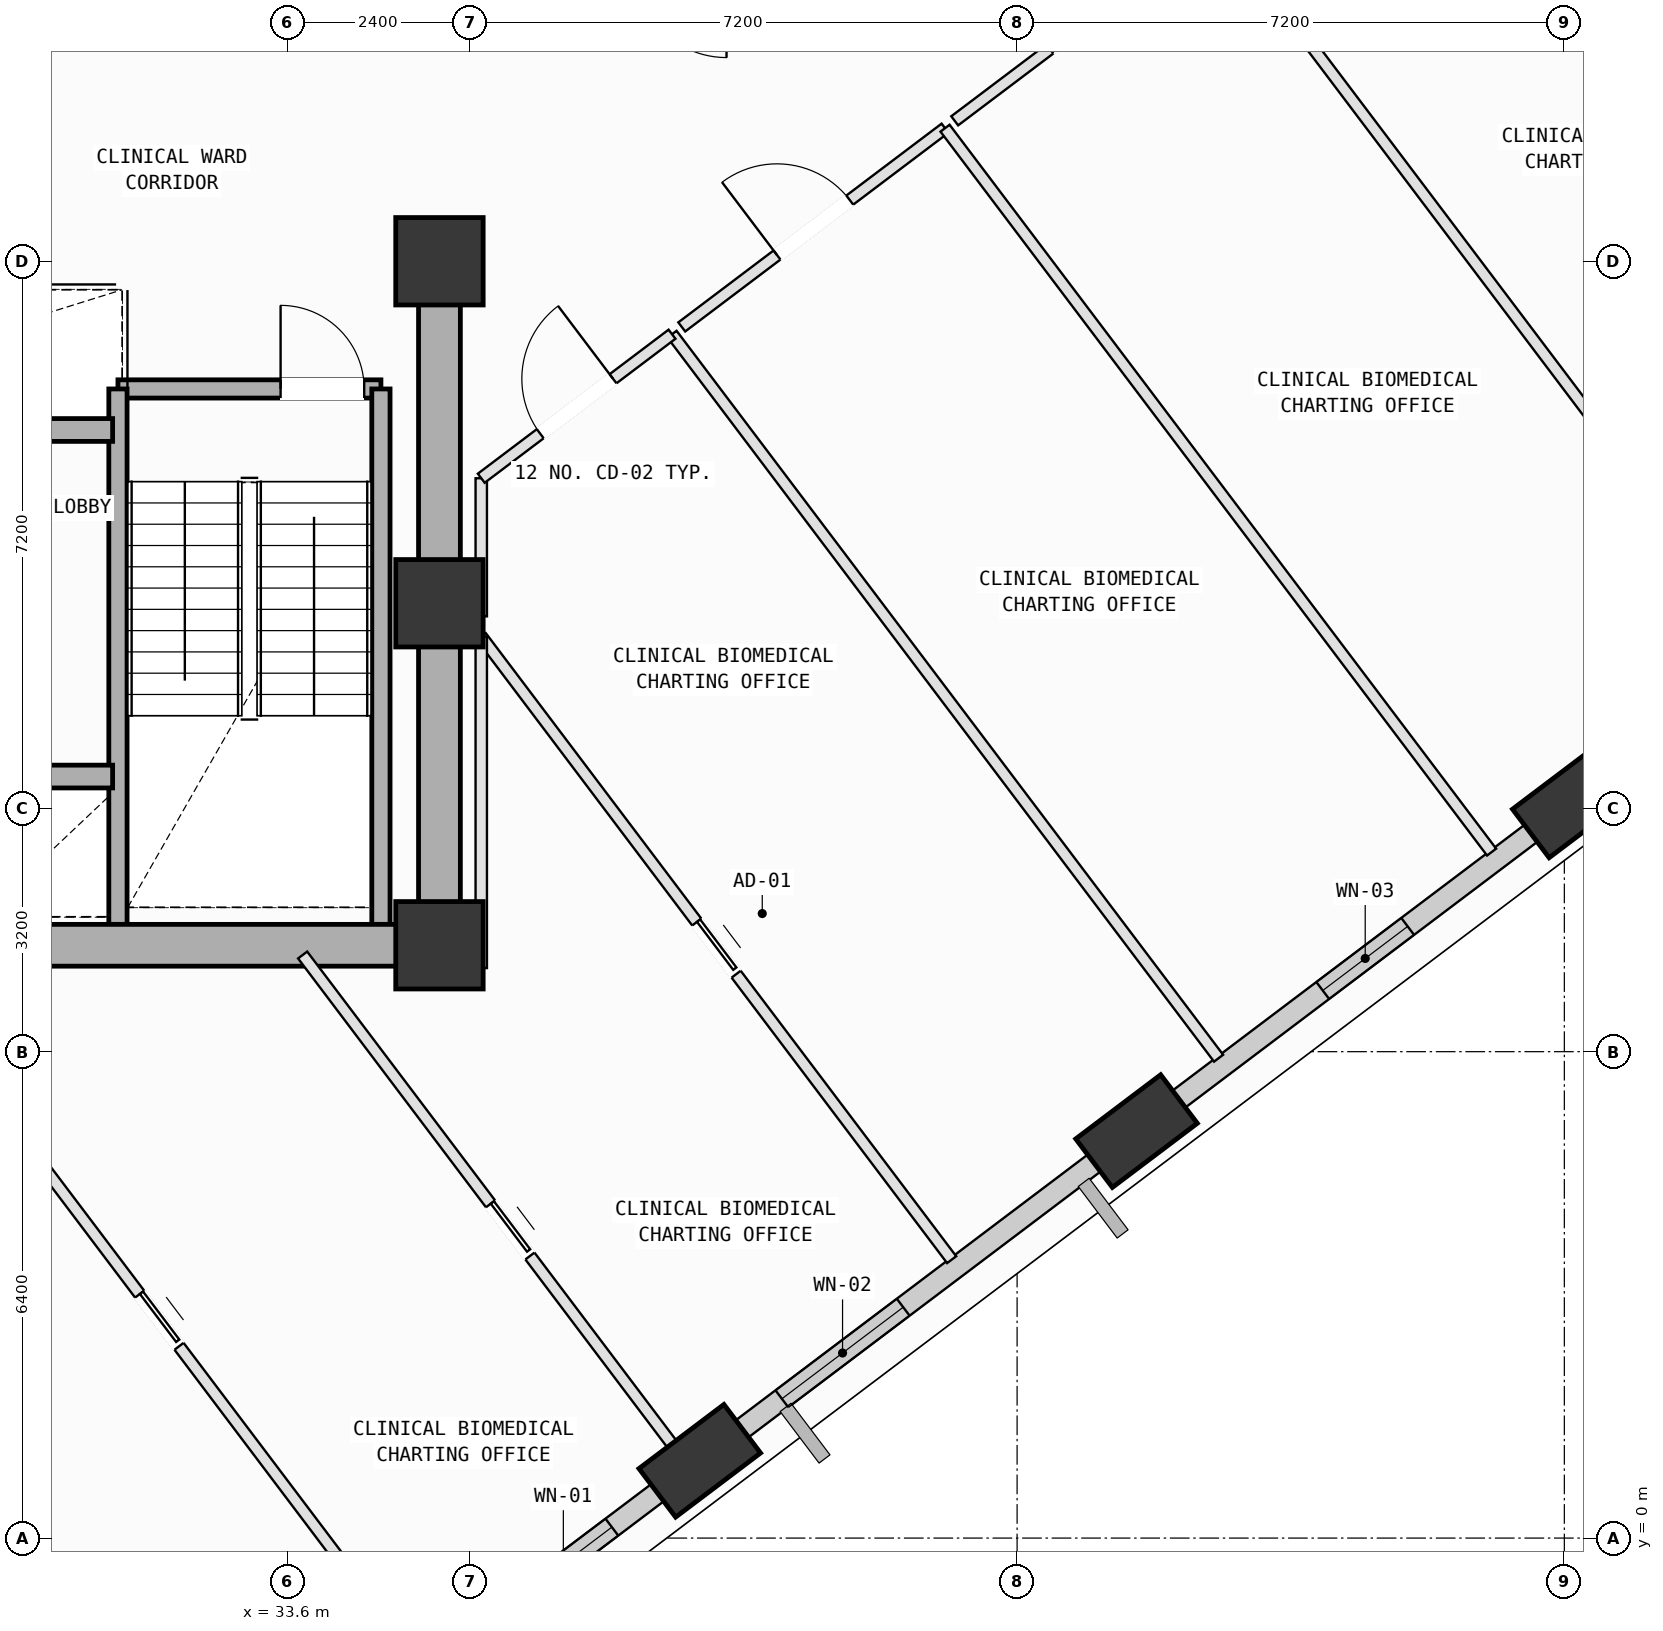
"""IFC4 building model, lengths in metres.
Left out: names, types, materials, properties, quantities, classifications, styles, units other than length and angle.
Written with IfcOpenShell. Run it as: python <this file> out.ifc"""

import sys

from ifc_helpers import new_model, si_unit, direction, frame, frame_2d, origin, origin_2d, place, context, subcontext, project, spatial, rectangle, extrude, element, fill, save


model = new_model("IFC4")
c1 = context("Model", 3, precision=1e-05, world=origin(), true_north=direction((0.0, 1.0)))
c2 = subcontext(c1, "Body", "Model", "MODEL_VIEW")
j1 = project(units=[si_unit("LENGTHUNIT", "METRE"), si_unit("PLANEANGLEUNIT", "RADIAN")], contexts=[c1])
p1 = place(None, origin())
s1 = spatial("IfcSite", under=j1, at=p1, CompositionType="ELEMENT")
p2 = place(p1, origin())
s2 = spatial("IfcBuilding", under=s1, at=p2, CompositionType="ELEMENT")
p3 = place(p2, frame((0.0, 0.0, 181.8)))
s3 = spatial("IfcBuildingStorey", under=s2, at=p3, CompositionType="ELEMENT", Elevation=181.8)
for number, where, z_axis, x_axis in (
    (1, (35.6, 7.8, 0.0), (0.0, 0.0, 1.0), (1.0, 0.0, 0.0)),
    (2, (35.6, 12.3, 0.0), (0.0, 0.0, 1.0), (1.0, 0.0, 0.0)),
    (3, (35.6, 16.8, 0.0), (0.0, 0.0, 1.0), (1.0, 0.0, 0.0)),
):
    element("IfcColumn", number, at=place(p3, frame(where, z_axis=z_axis, x_axis=x_axis)), inside=s3, PredefinedType="COLUMN", context=c2, shape_type="SweptSolid", body=[
        extrude(rectangle(XDim=1.15, YDim=1.15, at=origin_2d()), origin(), (0.0, 0.0, 1.0), 4.0),
    ])
p4 = place(p3, frame((39.025, 1.017, 0.002), z_axis=(0.09791826999, 0.023157579681, 0.994924991598), x_axis=(-0.767046942776, 0.638720341276, 0.060624361585)))
e4 = element("IfcColumn", 4, at=p4, inside=s3, PredefinedType="COLUMN", context=c2, shape_type="SweptSolid", body=[
    extrude(rectangle(XDim=1.4, YDim=0.8, at=origin_2d()), origin(), (0.0, 0.0, 1.0), 4.017),
])
p5 = place(p3, frame((44.771, 5.355, 0.002), z_axis=(0.079868491855, 0.046716680689, 0.995710086197), x_axis=(-0.920806126537, 0.386015680716, 0.055749184517)))
e5 = element("IfcColumn", 5, at=p5, inside=s3, PredefinedType="COLUMN", context=c2, shape_type="SweptSolid", body=[
    extrude(rectangle(XDim=1.4, YDim=0.8, at=origin_2d()), origin(), (0.0, 0.0, 1.0), 4.014),
])
p6 = place(p3, frame((50.518, 9.693, 0.002), z_axis=(0.061795746377, 0.070371730864, 0.995604894135), x_axis=(-0.995519092087, 0.075879665536, 0.05642706485)))
e6 = element("IfcColumn", 6, at=p6, inside=s3, PredefinedType="COLUMN", context=c2, shape_type="SweptSolid", body=[
    extrude(rectangle(XDim=1.4, YDim=0.8, at=origin_2d()), origin(), (0.0, 0.0, 1.0), 4.014),
])
p7 = place(p3, frame((38.782, 0.833, 0.0), z_axis=(0.0, 0.0, 1.0), x_axis=(-0.798116310231, -0.602503406914, 0.0)))
e7 = element("IfcWall", 7, at=p7, inside=s3, PredefinedType="SOLIDWALL", context=c2, shape_type="SweptSolid", body=[
    extrude(rectangle(XDim=6.234, YDim=0.28, at=frame_2d((3.117, 0.0))), origin(), (0.0, 0.0, 1.0), 3.265),
])
p8 = place(p7, frame((1.145, 0.0, 0.75)))
e8 = element("IfcOpeningElement", 8, at=p8, cuts=e7, PredefinedType="OPENING", context=c2, shape_type="SweptSolid", body=[
    extrude(rectangle(XDim=1.6, YDim=1.95, at=frame_2d((0.8, 0.975))), frame((0.0, 0.15, 0.0), z_axis=(0.0, -1.0, 0.0), x_axis=(1.0, 0.0, 0.0)), (0.0, 0.0, 1.0), 0.3),
])
p9 = place(p3, frame((44.523, 5.167, 0.0), z_axis=(0.0, 0.0, 1.0), x_axis=(-0.798115007823, -0.602505132167, 0.0)))
e9 = element("IfcWall", 9, at=p9, inside=s3, PredefinedType="SOLIDWALL", context=c2, shape_type="SweptSolid", body=[
    extrude(rectangle(XDim=6.214, YDim=0.28, at=frame_2d((3.107, 0.0))), origin(), (0.0, 0.0, 1.0), 3.265),
])
p10 = place(p9, frame((3.535, 0.0, 0.75)))
e10 = element("IfcOpeningElement", 10, at=p10, cuts=e9, PredefinedType="OPENING", context=c2, shape_type="SweptSolid", body=[
    extrude(rectangle(XDim=2.0, YDim=1.95, at=frame_2d((1.0, 0.975))), frame((0.0, 0.15, 0.0), z_axis=(0.0, -1.0, 0.0), x_axis=(1.0, 0.0, 0.0)), (0.0, 0.0, 1.0), 0.3),
])
p11 = place(p3, frame((50.27, 9.506, 0.0), z_axis=(0.0, 0.0, 1.0), x_axis=(-0.798099248816, -0.60252600694, 0.0)))
e11 = element("IfcWall", 11, at=p11, inside=s3, PredefinedType="SOLIDWALL", context=c2, shape_type="SweptSolid", body=[
    extrude(rectangle(XDim=6.209, YDim=0.28, at=frame_2d((3.104, 0.0))), origin(), (0.0, 0.0, 1.0), 3.265),
])
p12 = place(p11, frame((2.419, 0.0, 0.75)))
e12 = element("IfcOpeningElement", 12, at=p12, cuts=e11, PredefinedType="OPENING", context=c2, shape_type="SweptSolid", body=[
    extrude(rectangle(XDim=1.4, YDim=1.85, at=frame_2d((0.7, 0.925))), frame((0.0, 0.15, 0.0), z_axis=(0.0, -1.0, 0.0), x_axis=(1.0, 0.0, 0.0)), (0.0, 0.0, 1.0), 0.3),
])
p13 = place(p3, frame((31.37, 15.12, 0.0), z_axis=(0.0, 0.0, 1.0), x_axis=(1.0, 0.0, 0.0)))
e13 = element("IfcWall", 13, at=p13, inside=s3, PredefinedType="SOLIDWALL", context=c2, shape_type="SweptSolid", body=[
    extrude(rectangle(XDim=3.46, YDim=0.24, at=frame_2d((1.73, 0.0))), origin(), (0.0, 0.0, 1.0), 3.78),
])
p14 = place(p13, frame((2.14, 0.0, 0.0)))
e14 = element("IfcOpeningElement", 14, at=p14, cuts=e13, PredefinedType="OPENING", context=c2, shape_type="SweptSolid", body=[
    extrude(rectangle(XDim=1.1, YDim=2.15, at=frame_2d((0.55, 1.075))), frame((0.0, 0.13, 0.0), z_axis=(0.0, -1.0, 0.0), x_axis=(1.0, 0.0, 0.0)), (0.0, 0.0, 1.0), 0.26),
])
for number, where, z_axis, x_axis in (
    (15, (34.83, 15.12, 0.0), (0.0, 0.0, 1.0), (0.0, -1.0, 0.0)),
    (16, (31.37, 8.075, 0.0), (0.0, 0.0, 1.0), (0.0, 1.0, 0.0)),
):
    element("IfcWall", number, at=place(p3, frame(where, z_axis=z_axis, x_axis=x_axis)), inside=s3, PredefinedType="SOLIDWALL", context=c2, shape_type="SweptSolid", body=[
        extrude(rectangle(XDim=7.045, YDim=0.24, at=frame_2d((3.522, 0.0))), origin(), (0.0, 0.0, 1.0), 3.78),
    ])
p15 = place(p3, frame((24.8, 7.8, 0.0), z_axis=(0.0, 0.0, 1.0), x_axis=(1.0, 0.0, 0.0)))
e17 = element("IfcWall", 17, at=p15, inside=s3, PredefinedType="SHEAR", context=c2, shape_type="SweptSolid", body=[
    extrude(rectangle(XDim=10.8, YDim=0.55, at=frame_2d((5.4, 0.0))), origin(), (0.0, 0.0, 1.0), 3.78),
])
p16 = place(p3, frame((35.6, 7.8, 0.0), z_axis=(0.0, 0.0, 1.0), x_axis=(0.0, 1.0, 0.0)))
e18 = element("IfcWall", 18, at=p16, inside=s3, PredefinedType="SHEAR", context=c2, shape_type="SweptSolid", body=[
    extrude(rectangle(XDim=9.0, YDim=0.55, at=frame_2d((4.5, 0.0))), origin(), (0.0, 0.0, 1.0), 3.78),
])
p17 = place(p3, frame((29.6, 10.02, 0.0), z_axis=(0.0, 0.0, 1.0), x_axis=(1.0, 0.0, 0.0)))
e19 = element("IfcWall", 19, at=p17, inside=s3, PredefinedType="SOLIDWALL", context=c2, shape_type="SweptSolid", body=[
    extrude(rectangle(XDim=1.7, YDim=0.3, at=frame_2d((0.85, 0.0))), origin(), (0.0, 0.0, 1.0), 3.78),
])
p18 = place(p3, frame((25.85, 14.58, 0.0), z_axis=(0.0, 0.0, 1.0), x_axis=(1.0, 0.0, 0.0)))
e20 = element("IfcWall", 20, at=p18, inside=s3, PredefinedType="SOLIDWALL", context=c2, shape_type="SweptSolid", body=[
    extrude(rectangle(XDim=5.45, YDim=0.3, at=frame_2d((2.725, 0.0))), origin(), (0.0, 0.0, 1.0), 3.78),
])
p19 = place(p18, frame((0.34, 0.0, 0.0)))
e21 = element("IfcOpeningElement", 21, at=p19, cuts=e20, PredefinedType="OPENING", context=c2, shape_type="SweptSolid", body=[
    extrude(rectangle(XDim=1.12, YDim=2.15, at=frame_2d((0.56, 1.075))), frame((0.0, 0.16, 0.0), z_axis=(0.0, -1.0, 0.0), x_axis=(1.0, 0.0, 0.0)), (0.0, 0.0, 1.0), 0.32),
])
p20 = place(p18, frame((2.24, 0.0, 0.0)))
e22 = element("IfcOpeningElement", 22, at=p20, cuts=e20, PredefinedType="OPENING", context=c2, shape_type="SweptSolid", body=[
    extrude(rectangle(XDim=1.12, YDim=2.15, at=frame_2d((0.56, 1.075))), frame((0.0, 0.16, 0.0), z_axis=(0.0, -1.0, 0.0), x_axis=(1.0, 0.0, 0.0)), (0.0, 0.0, 1.0), 0.32),
])
p21 = place(p3, frame((28.287, 7.672, 0.0), z_axis=(0.0, 0.0, 1.0), x_axis=(0.602494949449, -0.798122694758, 0.0)))
e23 = element("IfcWall", 23, at=p21, inside=s3, PredefinedType="PARTITIONING", context=c2, shape_type="SweptSolid", body=[
    extrude(rectangle(XDim=11.666, YDim=0.15, at=frame_2d((5.833, 0.0))), origin(), (0.0, 0.0, 1.0), 3.78),
])
p22 = place(p21, frame((5.591, 0.0, 0.0)))
e24 = element("IfcOpeningElement", 24, at=p22, cuts=e23, PredefinedType="OPENING", context=c2, shape_type="SweptSolid", body=[
    extrude(rectangle(XDim=0.86, YDim=2.06, at=frame_2d((0.43, 1.03))), frame((0.0, 0.085, 0.0), z_axis=(0.0, -1.0, 0.0), x_axis=(1.0, 0.0, 0.0)), (0.0, 0.0, 1.0), 0.17),
])
p23 = place(p3, frame((33.8, 7.672, 0.0), z_axis=(0.0, 0.0, 1.0), x_axis=(0.602541315971, -0.798087691014, 0.0)))
e25 = element("IfcWall", 25, at=p23, inside=s3, PredefinedType="PARTITIONING", context=c2, shape_type="SweptSolid", body=[
    extrude(rectangle(XDim=8.69, YDim=0.15, at=frame_2d((4.345, 0.0))), origin(), (0.0, 0.0, 1.0), 3.78),
])
p24 = place(p23, frame((4.103, 0.0, 0.0)))
e26 = element("IfcOpeningElement", 26, at=p24, cuts=e25, PredefinedType="OPENING", context=c2, shape_type="SweptSolid", body=[
    extrude(rectangle(XDim=0.86, YDim=2.06, at=frame_2d((0.43, 1.03))), frame((0.0, 0.085, 0.0), z_axis=(0.0, -1.0, 0.0), x_axis=(1.0, 0.0, 0.0)), (0.0, 0.0, 1.0), 0.17),
])
p25 = place(p3, frame((36.15, 11.862, 0.0), z_axis=(0.0, 0.0, 1.0), x_axis=(0.602487751948, -0.79812812803, 0.0)))
e27 = element("IfcWall", 27, at=p25, inside=s3, PredefinedType="PARTITIONING", context=c2, shape_type="SweptSolid", body=[
    extrude(rectangle(XDim=10.273, YDim=0.15, at=frame_2d((5.136, 0.0))), origin(), (0.0, 0.0, 1.0), 3.78),
])
p26 = place(p25, frame((4.706, 0.0, 0.0)))
e28 = element("IfcOpeningElement", 28, at=p26, cuts=e27, PredefinedType="OPENING", context=c2, shape_type="SweptSolid", body=[
    extrude(rectangle(XDim=0.86, YDim=2.06, at=frame_2d((0.43, 1.03))), frame((0.0, 0.085, 0.0), z_axis=(0.0, -1.0, 0.0), x_axis=(1.0, 0.0, 0.0)), (0.0, 0.0, 1.0), 0.17),
])
p27 = place(p3, frame((39.702, 1.24, 0.0), z_axis=(0.0, 0.0, 1.0), x_axis=(-0.797956198475, -0.602715443071, 0.0)))
e29 = element("IfcWall", 29, at=p27, inside=s3, PredefinedType="PARTITIONING", context=c2, shape_type="SweptSolid", body=[
    extrude(rectangle(XDim=0.675, YDim=0.15, at=frame_2d((0.338, 0.0))), origin(), (0.0, 0.0, 1.0), 3.265),
])
p28 = place(p3, frame((35.6, 7.5, 0.0), z_axis=(0.0, 0.0, 1.0), x_axis=(1.0, 0.0, 0.0)))
e30 = element("IfcWall", 30, at=p28, inside=s3, PredefinedType="PARTITIONING", context=c2, shape_type="SweptSolid", body=[
    extrude(rectangle(XDim=0.55, YDim=0.15, at=frame_2d((0.275, 0.0))), origin(), (0.0, 0.0, 1.0), 3.065),
])
p29 = place(p3, frame((36.15, 7.5, 0.0), z_axis=(0.0, 0.0, 1.0), x_axis=(0.0, 1.0, 0.0)))
e31 = element("IfcWall", 31, at=p29, inside=s3, PredefinedType="PARTITIONING", context=c2, shape_type="SweptSolid", body=[
    extrude(rectangle(XDim=4.362, YDim=0.15, at=frame_2d((2.181, 0.0))), origin(), (0.0, 0.0, 1.0), 3.78),
])
p30 = place(p3, frame((38.66, 15.84, 0.0), z_axis=(0.0, 0.0, 1.0), x_axis=(0.602494190997, -0.798123267306, 0.0)))
e32 = element("IfcWall", 32, at=p30, inside=s3, PredefinedType="PARTITIONING", context=c2, shape_type="SweptSolid", body=[
    extrude(rectangle(XDim=11.936, YDim=0.15, at=frame_2d((5.968, 0.0))), origin(), (0.0, 0.0, 1.0), 3.78),
])
p31 = place(p3, frame((45.453, 5.581, 0.0), z_axis=(0.0, 0.0, 1.0), x_axis=(-0.798014769905, -0.602637890456, 0.0)))
e33 = element("IfcWall", 33, at=p31, inside=s3, PredefinedType="PARTITIONING", context=c2, shape_type="SweptSolid", body=[
    extrude(rectangle(XDim=0.991, YDim=0.15, at=frame_2d((0.496, 0.0))), origin(), (0.0, 0.0, 1.0), 3.265),
])
p32 = place(p3, frame((36.15, 12.128, 0.0), z_axis=(0.0, 0.0, 1.0), x_axis=(0.0, 1.0, 0.0)))
e34 = element("IfcWall", 34, at=p32, inside=s3, PredefinedType="PARTITIONING", context=c2, shape_type="SweptSolid", body=[
    extrude(rectangle(XDim=1.817, YDim=0.15, at=frame_2d((0.909, 0.0))), origin(), (0.0, 0.0, 1.0), 3.78),
])
p33 = place(p3, frame((36.15, 13.945, 0.0), z_axis=(0.0, 0.0, 1.0), x_axis=(0.79808631642, 0.602543136665, 0.0)))
e35 = element("IfcWall", 35, at=p33, inside=s3, PredefinedType="PARTITIONING", context=c2, shape_type="SweptSolid", body=[
    extrude(rectangle(XDim=3.145, YDim=0.15, at=frame_2d((1.573, 0.0))), origin(), (0.0, 0.0, 1.0), 3.78),
])
p34 = place(p33, frame((0.972, 0.0, 0.0)))
e36 = element("IfcOpeningElement", 36, at=p34, cuts=e35, PredefinedType="OPENING", context=c2, shape_type="SweptSolid", body=[
    extrude(rectangle(XDim=1.2, YDim=2.15, at=frame_2d((0.6, 1.075))), frame((0.0, 0.085, 0.0), z_axis=(0.0, -1.0, 0.0), x_axis=(1.0, 0.0, 0.0)), (0.0, 0.0, 1.0), 0.17),
])
p35 = place(p3, frame((38.788, 15.936, 0.0), z_axis=(0.0, 0.0, 1.0), x_axis=(0.798105957369, 0.602517120763, 0.0)))
e37 = element("IfcWall", 37, at=p35, inside=s3, PredefinedType="PARTITIONING", context=c2, shape_type="SweptSolid", body=[
    extrude(rectangle(XDim=4.34, YDim=0.15, at=frame_2d((2.17, 0.0))), origin(), (0.0, 0.0, 1.0), 3.78),
])
p36 = place(p35, frame((1.57, 0.0, 0.0)))
e38 = element("IfcOpeningElement", 38, at=p36, cuts=e37, PredefinedType="OPENING", context=c2, shape_type="SweptSolid", body=[
    extrude(rectangle(XDim=1.2, YDim=2.15, at=frame_2d((0.6, 1.075))), frame((0.0, 0.085, 0.0), z_axis=(0.0, -1.0, 0.0), x_axis=(1.0, 0.0, 0.0)), (0.0, 0.0, 1.0), 0.17),
])
p37 = place(p3, frame((42.252, 18.551, 0.0), z_axis=(0.0, 0.0, 1.0), x_axis=(0.602533536667, -0.798093564184, 0.0)))
e39 = element("IfcWall", 39, at=p37, inside=s3, PredefinedType="PARTITIONING", context=c2, shape_type="SweptSolid", body=[
    extrude(rectangle(XDim=11.935, YDim=0.15, at=frame_2d((5.967, 0.0))), origin(), (0.0, 0.0, 1.0), 3.78),
])
p38 = place(p3, frame((42.379, 18.648, 0.0), z_axis=(0.0, 0.0, 1.0), x_axis=(0.798234572406, 0.602346716946, 0.0)))
e40 = element("IfcWall", 40, at=p38, inside=s3, PredefinedType="PARTITIONING", context=c2, shape_type="SweptSolid", body=[
    extrude(rectangle(XDim=4.34, YDim=0.15, at=frame_2d((2.17, 0.0))), origin(), (0.0, 0.0, 1.0), 3.78),
])
p39 = place(p38, frame((1.57, 0.0, 0.0)))
e41 = element("IfcOpeningElement", 41, at=p39, cuts=e40, PredefinedType="OPENING", context=c2, shape_type="SweptSolid", body=[
    extrude(rectangle(XDim=1.2, YDim=2.15, at=frame_2d((0.6, 1.075))), frame((0.0, 0.085, 0.0), z_axis=(0.0, -1.0, 0.0), x_axis=(1.0, 0.0, 0.0)), (0.0, 0.0, 1.0), 0.17),
])
p40 = place(p3, frame((45.843, 21.262, 0.0), z_axis=(0.0, 0.0, 1.0), x_axis=(0.602530343885, -0.798095974616, 0.0)))
e42 = element("IfcWall", 42, at=p40, inside=s3, PredefinedType="PARTITIONING", context=c2, shape_type="SweptSolid", body=[
    extrude(rectangle(XDim=11.935, YDim=0.15, at=frame_2d((5.967, 0.0))), origin(), (0.0, 0.0, 1.0), 3.415),
])
p41 = place(p3, frame((51.198, 9.919, 0.0), z_axis=(0.0, 0.0, 1.0), x_axis=(-0.798339084961, -0.602208191097, 0.0)))
e43 = element("IfcWall", 43, at=p41, inside=s3, PredefinedType="PARTITIONING", context=c2, shape_type="SweptSolid", body=[
    extrude(rectangle(XDim=0.99, YDim=0.15, at=frame_2d((0.495, 0.0))), origin(), (0.0, 0.0, 1.0), 3.265),
])
p42 = place(p3, frame((49.435, 23.974, 0.0), z_axis=(0.0, 0.0, 1.0), x_axis=(0.60250679657, -0.798113751346, 0.0)))
e44 = element("IfcWall", 44, at=p42, inside=s3, PredefinedType="PARTITIONING", context=c2, shape_type="SweptSolid", body=[
    extrude(rectangle(XDim=12.28, YDim=0.15, at=frame_2d((6.14, 0.0))), origin(), (0.0, 0.0, 1.0), 3.78),
])
p43 = place(p8, origin())
e45 = element("IfcWindow", 45, at=p43, inside=s3, PartitioningType="SINGLE_PANEL", PredefinedType="WINDOW", context=c2, shape_type="SweptSolid", body=[
    extrude(rectangle(XDim=1.6, YDim=1.95, at=frame_2d((0.8, 0.975))), frame((0.0, 0.03, 0.0), z_axis=(0.0, -1.0, 0.0), x_axis=(1.0, 0.0, 0.0)), (0.0, 0.0, 1.0), 0.06),
])
fill(e8, e45)
p44 = place(p10, origin())
e46 = element("IfcWindow", 46, at=p44, inside=s3, PartitioningType="SINGLE_PANEL", PredefinedType="WINDOW", context=c2, shape_type="SweptSolid", body=[
    extrude(rectangle(XDim=2.0, YDim=1.95, at=frame_2d((1.0, 0.975))), frame((0.0, 0.03, 0.0), z_axis=(0.0, -1.0, 0.0), x_axis=(1.0, 0.0, 0.0)), (0.0, 0.0, 1.0), 0.06),
])
fill(e10, e46)
p45 = place(p12, origin())
e47 = element("IfcWindow", 47, at=p45, inside=s3, PartitioningType="SINGLE_PANEL", PredefinedType="WINDOW", context=c2, shape_type="SweptSolid", body=[
    extrude(rectangle(XDim=1.4, YDim=1.85, at=frame_2d((0.7, 0.925))), frame((0.0, 0.03, 0.0), z_axis=(0.0, -1.0, 0.0), x_axis=(1.0, 0.0, 0.0)), (0.0, 0.0, 1.0), 0.06),
])
fill(e12, e47)
p46 = place(p14, origin())
e48 = element("IfcDoor", 48, at=p46, inside=s3, OperationType="SINGLE_SWING_LEFT", PredefinedType="DOOR", context=c2, shape_type="SweptSolid", body=[
    extrude(rectangle(XDim=1.1, YDim=2.15, at=frame_2d((0.55, 1.075))), frame((0.0, 0.025, 0.0), z_axis=(0.0, -1.0, 0.0), x_axis=(1.0, 0.0, 0.0)), (0.0, 0.0, 1.0), 0.05),
])
fill(e14, e48)
p47 = place(p34, origin())
e49 = element("IfcDoor", 49, at=p47, inside=s3, OperationType="SINGLE_SWING_RIGHT", PredefinedType="DOOR", context=c2, shape_type="SweptSolid", body=[
    extrude(rectangle(XDim=1.2, YDim=2.15, at=frame_2d((0.6, 1.075))), frame((0.0, 0.025, 0.0), z_axis=(0.0, -1.0, 0.0), x_axis=(1.0, 0.0, 0.0)), (0.0, 0.0, 1.0), 0.05),
])
fill(e36, e49)
p48 = place(p36, origin())
e50 = element("IfcDoor", 50, at=p48, inside=s3, OperationType="SINGLE_SWING_LEFT", PredefinedType="DOOR", context=c2, shape_type="SweptSolid", body=[
    extrude(rectangle(XDim=1.2, YDim=2.15, at=frame_2d((0.6, 1.075))), frame((0.0, 0.025, 0.0), z_axis=(0.0, -1.0, 0.0), x_axis=(1.0, 0.0, 0.0)), (0.0, 0.0, 1.0), 0.05),
])
fill(e38, e50)
p49 = place(p26, origin())
e51 = element("IfcDoor", 51, at=p49, inside=s3, OperationType="SLIDING_TO_LEFT", PredefinedType="DOOR", context=c2, shape_type="SweptSolid", body=[
    extrude(rectangle(XDim=0.86, YDim=2.06, at=frame_2d((0.43, 1.03))), frame((0.0, 0.025, 0.0), z_axis=(0.0, -1.0, 0.0), x_axis=(1.0, 0.0, 0.0)), (0.0, 0.0, 1.0), 0.05),
])
fill(e28, e51)
p50 = place(p24, origin())
e52 = element("IfcDoor", 52, at=p50, inside=s3, OperationType="SLIDING_TO_LEFT", PredefinedType="DOOR", context=c2, shape_type="SweptSolid", body=[
    extrude(rectangle(XDim=0.86, YDim=2.06, at=frame_2d((0.43, 1.03))), frame((0.0, 0.025, 0.0), z_axis=(0.0, -1.0, 0.0), x_axis=(1.0, 0.0, 0.0)), (0.0, 0.0, 1.0), 0.05),
])
fill(e26, e52)
p51 = place(p22, origin())
e53 = element("IfcDoor", 53, at=p51, inside=s3, OperationType="SLIDING_TO_LEFT", PredefinedType="DOOR", context=c2, shape_type="SweptSolid", body=[
    extrude(rectangle(XDim=0.86, YDim=2.06, at=frame_2d((0.43, 1.03))), frame((0.0, 0.025, 0.0), z_axis=(0.0, -1.0, 0.0), x_axis=(1.0, 0.0, 0.0)), (0.0, 0.0, 1.0), 0.05),
])
fill(e24, e53)
save(model, sys.argv[1])
